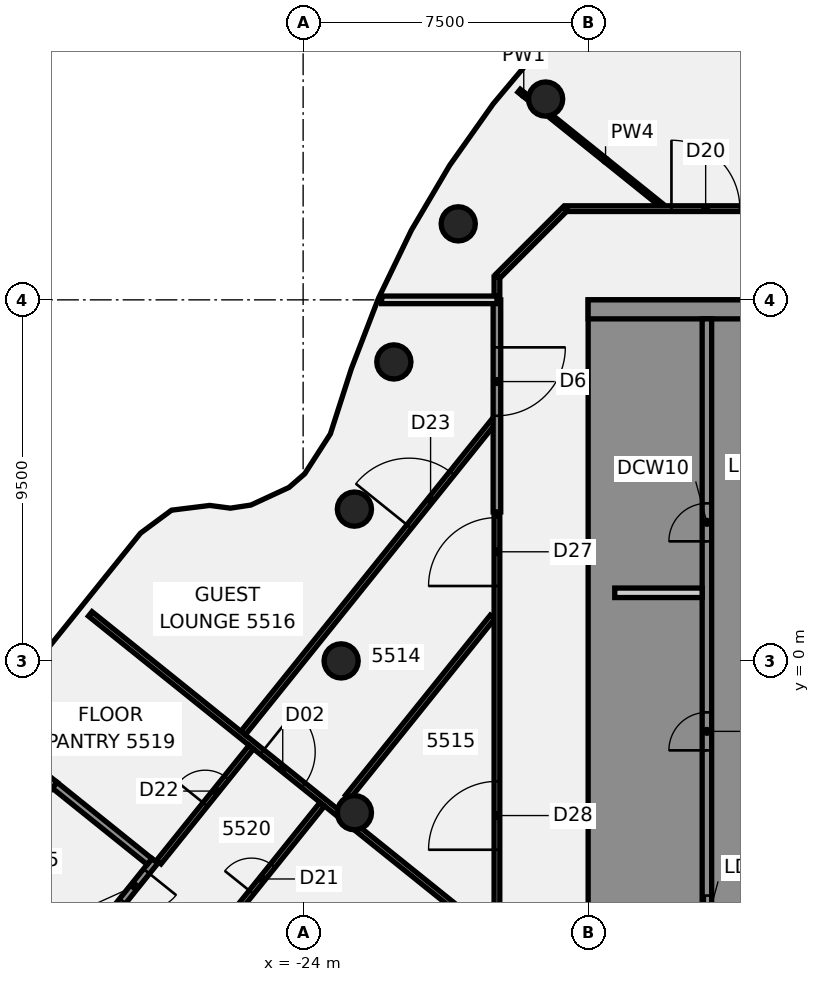
"""IFC4 building model, lengths in metres.
Left out: names, types, materials, properties, quantities, classifications, styles, units other than length and angle.
Written with IfcOpenShell. Run it as: python <this file> out.ifc"""

import sys

from ifc_helpers import new_model, si_unit, direction, frame, frame_2d, origin, origin_2d, place, context, subcontext, project, spatial, polyline, rectangle, circle, outline, extrude, element, fill, save


model = new_model("IFC4")
c1 = context("Model", 3, precision=1e-05, world=origin(), true_north=direction((0.0, 1.0)))
c2 = subcontext(c1, "Body", "Model", "MODEL_VIEW")
j1 = project(units=[si_unit("LENGTHUNIT", "METRE"), si_unit("PLANEANGLEUNIT", "RADIAN")], contexts=[c1])
p1 = place(None, origin())
s1 = spatial("IfcSite", under=j1, at=p1, CompositionType="ELEMENT")
p2 = place(p1, origin())
s2 = spatial("IfcBuilding", under=s1, at=p2, CompositionType="ELEMENT")
p3 = place(p2, frame((0.0, 0.0, 219.9)))
s3 = spatial("IfcBuildingStorey", under=s2, at=p3, CompositionType="ELEMENT", Elevation=219.9)
for number, where, z_axis, x_axis in (
    (1, (-17.619, 14.784, -0.14), (0.0, 0.0, 1.0), (1.0, 0.0, 0.0)),
    (2, (-19.919, 11.5, -0.14), (0.0, 0.0, 1.0), (1.0, 0.0, 0.0)),
    (3, (-21.613, 7.866, -0.14), (0.0, 0.0, 1.0), (1.0, 0.0, 0.0)),
    (4, (-22.651, 3.994, -0.14), (0.0, 0.0, 1.0), (1.0, 0.0, 0.0)),
    (5, (-23.0, 0.0, -0.14), (0.0, 0.0, 1.0), (1.0, 0.0, 0.0)),
    (6, (-22.651, -3.994, -0.14), (0.0, 0.0, 1.0), (1.0, 0.0, 0.0)),
):
    element("IfcColumn", number, at=place(p3, frame(where, z_axis=z_axis, x_axis=x_axis)), inside=s3, PredefinedType="COLUMN", context=c2, shape_type="SweptSolid", body=[
        extrude(circle(Radius=0.45, at=origin_2d()), origin(), (0.0, 0.0, 1.0), 3.6),
    ])
p4 = place(p3, frame((-29.602, 1.236, 0.0), z_axis=(0.0, 0.0, 1.0), x_axis=(0.779408775424, -0.626515730681, 0.0)))
e7 = element("IfcWall", 7, at=p4, inside=s3, PredefinedType="PARTITIONING", context=c2, shape_type="SweptSolid", body=[
    extrude(rectangle(XDim=8.332, YDim=0.15, at=frame_2d((4.166, 0.0))), origin(), (0.0, 0.0, 1.0), 2.864),
])
p5 = place(p4, frame((5.799, 0.0, 0.0)))
e8 = element("IfcOpeningElement", 8, at=p5, cuts=e7, PredefinedType="OPENING", context=c2, shape_type="SweptSolid", body=[
    extrude(rectangle(XDim=1.4, YDim=2.1, at=frame_2d((0.7, 1.05))), frame((0.0, 0.085, 0.0), z_axis=(0.0, -1.0, 0.0), x_axis=(1.0, 0.0, 0.0)), (0.0, 0.0, 1.0), 0.17),
])
p6 = place(p3, frame((-22.555, -4.428, 0.0), z_axis=(0.0, 0.0, 1.0), x_axis=(0.779423896045, -0.626496919604, 0.0)))
e9 = element("IfcWall", 9, at=p6, inside=s3, PredefinedType="PARTITIONING", context=c2, shape_type="SweptSolid", body=[
    extrude(rectangle(XDim=4.556, YDim=0.15, at=frame_2d((2.278, 0.0))), origin(), (0.0, 0.0, 1.0), 2.864),
])
p7 = place(p3, frame((-18.316, 15.002, 0.0), z_axis=(0.0, 0.0, 1.0), x_axis=(0.779570290479, -0.626314746914, 0.0)))
e10 = element("IfcWall", 10, at=p7, inside=s3, PredefinedType="PARTITIONING", context=c2, shape_type="SweptSolid", body=[
    extrude(rectangle(XDim=0.312, YDim=0.1, at=frame_2d((0.156, 0.0))), origin(), (0.0, 0.0, 1.0), 2.864),
])
p8 = place(p3, frame((-17.509, 14.354, 0.0), z_axis=(0.0, 0.0, 1.0), x_axis=(0.779411679893, -0.626512117398, 0.0)))
e11 = element("IfcWall", 11, at=p8, inside=s3, PredefinedType="PARTITIONING", context=c2, shape_type="SweptSolid", body=[
    extrude(rectangle(XDim=3.765, YDim=0.1, at=frame_2d((1.883, 0.0))), origin(), (0.0, 0.0, 1.0), 2.864),
])
p9 = place(p3, frame((-12.665, 22.432, 0.0), z_axis=(0.0, 0.0, 1.0), x_axis=(0.779284245227, -0.626670619338, 0.0)))
e12 = element("IfcWall", 12, at=p9, inside=s3, PredefinedType="PARTITIONING", context=c2, shape_type="SweptSolid", body=[
    extrude(rectangle(XDim=16.621, YDim=0.15, at=frame_2d((8.311, 0.0))), origin(), (0.0, 0.0, 1.0), 2.864),
])
p10 = place(p3, frame((-17.065, 11.9, 0.0), z_axis=(0.0, 0.0, 1.0), x_axis=(1.0, 0.0, 0.0)))
e13 = element("IfcWall", 13, at=p10, inside=s3, PredefinedType="PARTITIONING", context=c2, shape_type="SweptSolid", body=[
    extrude(rectangle(XDim=34.165, YDim=0.15, at=frame_2d((17.083, 0.0))), origin(), (0.0, 0.0, 1.0), 2.864),
])
p11 = place(p10, frame((24.142, 0.0, 0.0)))
e14 = element("IfcOpeningElement", 14, at=p11, cuts=e13, PredefinedType="OPENING", context=c2, shape_type="SweptSolid", body=[
    extrude(rectangle(XDim=1.8, YDim=2.1, at=frame_2d((0.9, 1.05))), frame((0.0, 0.085, 0.0), z_axis=(0.0, -1.0, 0.0), x_axis=(1.0, 0.0, 0.0)), (0.0, 0.0, 1.0), 0.17),
])
p12 = place(p10, frame((9.207, 0.0, 0.0)))
e15 = element("IfcOpeningElement", 15, at=p12, cuts=e13, PredefinedType="OPENING", context=c2, shape_type="SweptSolid", body=[
    extrude(rectangle(XDim=1.8, YDim=2.1, at=frame_2d((0.9, 1.05))), frame((0.0, 0.085, 0.0), z_axis=(0.0, -1.0, 0.0), x_axis=(1.0, 0.0, 0.0)), (0.0, 0.0, 1.0), 0.17),
])
p13 = place(p10, frame((2.757, 0.0, 0.0)))
e16 = element("IfcOpeningElement", 16, at=p13, cuts=e13, PredefinedType="OPENING", context=c2, shape_type="SweptSolid", body=[
    extrude(rectangle(XDim=1.8, YDim=2.1, at=frame_2d((0.9, 1.05))), frame((0.0, 0.085, 0.0), z_axis=(0.0, -1.0, 0.0), x_axis=(1.0, 0.0, 0.0)), (0.0, 0.0, 1.0), 0.17),
])
p14 = place(p3, frame((-18.872, 10.128, 0.0), z_axis=(0.0, 0.0, 1.0), x_axis=(0.707106781187, 0.707106781187, 0.0)))
e17 = element("IfcWall", 17, at=p14, inside=s3, PredefinedType="PARTITIONING", context=c2, shape_type="SweptSolid", body=[
    extrude(rectangle(XDim=2.505, YDim=0.15, at=frame_2d((1.253, 0.0))), origin(), (0.0, 0.0, 1.0), 2.864),
])
p15 = place(p3, frame((-29.036, -10.665, 0.0), z_axis=(0.0, 0.0, 1.0), x_axis=(0.626350653384, 0.779541441493, 0.0)))
e18 = element("IfcWall", 18, at=p15, inside=s3, PredefinedType="PARTITIONING", context=c2, shape_type="SweptSolid", body=[
    extrude(rectangle(XDim=8.84, YDim=0.15, at=frame_2d((4.42, 0.0))), origin(), (0.0, 0.0, 1.0), 2.864),
])
p16 = place(p15, frame((5.87, 0.0, 0.0)))
e19 = element("IfcOpeningElement", 19, at=p16, cuts=e18, PredefinedType="OPENING", context=c2, shape_type="SweptSolid", body=[
    extrude(rectangle(XDim=0.9, YDim=2.1, at=frame_2d((0.45, 1.05))), frame((0.0, 0.085, 0.0), z_axis=(0.0, -1.0, 0.0), x_axis=(1.0, 0.0, 0.0)), (0.0, 0.0, 1.0), 0.17),
])
p17 = place(p3, frame((-27.798, -5.295, 0.0), z_axis=(0.0, 0.0, 1.0), x_axis=(0.626664805056, 0.779288920814, 0.0)))
e20 = element("IfcWall", 20, at=p17, inside=s3, PredefinedType="PARTITIONING", context=c2, shape_type="SweptSolid", body=[
    extrude(rectangle(XDim=3.881, YDim=0.15, at=frame_2d((1.94, 0.0))), origin(), (0.0, 0.0, 1.0), 2.864),
])
p18 = place(p17, frame((1.95, 0.0, 0.0)))
e21 = element("IfcOpeningElement", 21, at=p18, cuts=e20, PredefinedType="OPENING", context=c2, shape_type="SweptSolid", body=[
    extrude(rectangle(XDim=0.9, YDim=2.1, at=frame_2d((0.45, 1.05))), frame((0.0, 0.085, 0.0), z_axis=(0.0, -1.0, 0.0), x_axis=(1.0, 0.0, 0.0)), (0.0, 0.0, 1.0), 0.17),
])
p19 = place(p3, frame((-25.578, -1.897, 0.0), z_axis=(0.0, 0.0, 1.0), x_axis=(0.626651590672, 0.779299546971, 0.0)))
e22 = element("IfcWall", 22, at=p19, inside=s3, PredefinedType="PARTITIONING", context=c2, shape_type="SweptSolid", body=[
    extrude(rectangle(XDim=10.656, YDim=0.15, at=frame_2d((5.328, 0.0))), origin(), (0.0, 0.0, 1.0), 2.864),
])
p20 = place(p19, frame((6.97, 0.0, 0.0)))
e23 = element("IfcOpeningElement", 23, at=p20, cuts=e22, PredefinedType="OPENING", context=c2, shape_type="SweptSolid", body=[
    extrude(rectangle(XDim=1.8, YDim=2.1, at=frame_2d((0.9, 1.05))), frame((0.0, 0.085, 0.0), z_axis=(0.0, -1.0, 0.0), x_axis=(1.0, 0.0, 0.0)), (0.0, 0.0, 1.0), 0.17),
])
p21 = place(p3, frame((-22.826, -3.581, 0.0), z_axis=(0.0, 0.0, 1.0), x_axis=(0.626622427276, 0.779322996988, 0.0)))
e24 = element("IfcWall", 24, at=p21, inside=s3, PredefinedType="PARTITIONING", context=c2, shape_type="SweptSolid", body=[
    extrude(rectangle(XDim=6.08, YDim=0.15, at=frame_2d((3.04, 0.0))), origin(), (0.0, 0.0, 1.0), 2.864),
])
p22 = place(p3, frame((-18.9, -10.1, 0.0), z_axis=(0.0, 0.0, 1.0), x_axis=(0.0, 1.0, 0.0)))
e25 = element("IfcWall", 25, at=p22, inside=s3, PredefinedType="PARTITIONING", context=c2, shape_type="SweptSolid", body=[
    extrude(rectangle(XDim=13.921, YDim=0.15, at=frame_2d((6.96, 0.0))), origin(), (0.0, 0.0, 1.0), 2.864),
])
p23 = place(p22, frame((12.071, 0.0, 0.0)))
e26 = element("IfcOpeningElement", 26, at=p23, cuts=e25, PredefinedType="OPENING", context=c2, shape_type="SweptSolid", body=[
    extrude(rectangle(XDim=1.8, YDim=2.1, at=frame_2d((0.9, 1.05))), frame((0.0, 0.085, 0.0), z_axis=(0.0, -1.0, 0.0), x_axis=(1.0, 0.0, 0.0)), (0.0, 0.0, 1.0), 0.17),
])
p24 = place(p22, frame((5.131, 0.0, 0.0)))
e27 = element("IfcOpeningElement", 27, at=p24, cuts=e25, PredefinedType="OPENING", context=c2, shape_type="SweptSolid", body=[
    extrude(rectangle(XDim=1.8, YDim=2.1, at=frame_2d((0.9, 1.05))), frame((0.0, 0.085, 0.0), z_axis=(0.0, -1.0, 0.0), x_axis=(1.0, 0.0, 0.0)), (0.0, 0.0, 1.0), 0.17),
])
p25 = place(p3, frame((-18.9, 9.6, 0.0), z_axis=(0.0, 0.0, 1.0), x_axis=(0.0, 1.0, 0.0)))
e28 = element("IfcWall", 28, at=p25, inside=s3, PredefinedType="PARTITIONING", context=c2, shape_type="SweptSolid", body=[
    extrude(rectangle(XDim=0.5, YDim=0.15, at=frame_2d((0.25, 0.0))), origin(), (0.0, 0.0, 1.0), 2.864),
])
p26 = place(p3, frame((-18.9, 9.5, 0.0), z_axis=(0.0, 0.0, 1.0), x_axis=(0.0, -1.0, 0.0)))
e29 = element("IfcWall", 29, at=p26, inside=s3, PredefinedType="SOLIDWALL", context=c2, shape_type="SweptSolid", body=[
    extrude(rectangle(XDim=5.579, YDim=0.2, at=frame_2d((2.79, 0.0))), origin(), (0.0, 0.0, 1.0), 2.964),
])
p27 = place(p26, frame((1.25, 0.0, 0.0)))
e30 = element("IfcOpeningElement", 30, at=p27, cuts=e29, PredefinedType="OPENING", context=c2, shape_type="SweptSolid", body=[
    extrude(rectangle(XDim=1.8, YDim=2.4, at=frame_2d((0.9, 1.2))), frame((0.0, 0.11, 0.0), z_axis=(0.0, -1.0, 0.0), x_axis=(1.0, 0.0, 0.0)), (0.0, 0.0, 1.0), 0.22),
])
p28 = place(p3, frame((-18.9, 9.5, 0.0), z_axis=(0.0, 0.0, 1.0), x_axis=(-1.0, 0.0, 0.0)))
e31 = element("IfcWall", 31, at=p28, inside=s3, PredefinedType="SOLIDWALL", context=c2, shape_type="SweptSolid", body=[
    extrude(rectangle(XDim=3.033, YDim=0.2, at=frame_2d((1.517, 0.0))), origin(), (0.0, 0.0, 1.0), 3.46),
])
p29 = place(p3, origin())
e32 = element("IfcWall", 32, at=p29, inside=s3, PredefinedType="SHEAR", context=c2, shape_type="SweptSolid", body=[
    extrude(outline(polyline([(-13.5, -8.125), (-16.0, -8.125), (-16.0, -5.625), (-13.5, -5.625), (-13.5, -5.375), (-16.0, -5.375), (-16.0, 5.375), (-13.5, 5.375), (-13.5, 5.625), (-16.0, 5.625), (-16.0, 8.125), (-13.5, 8.125), (-13.5, 9.0), (-16.0, 9.0), (-16.5, 9.0), (-16.5, -9.0), (-16.0, -9.0), (-13.5, -9.0), (-13.5, -8.125)])), origin(), (0.0, 0.0, 1.0), 3.46),
])
p30 = place(p3, frame((-16.5, 9.25, 0.0), z_axis=(0.0, 0.0, 1.0), x_axis=(1.0, 0.0, 0.0)))
e33 = element("IfcWall", 33, at=p30, inside=s3, PredefinedType="SHEAR", context=c2, shape_type="SweptSolid", body=[
    extrude(rectangle(XDim=13.0, YDim=0.5, at=frame_2d((6.5, 0.0))), origin(), (0.0, 0.0, 1.0), 3.46),
])
p31 = place(p3, frame((-13.375, -9.0, 0.0), z_axis=(0.0, 0.0, 1.0), x_axis=(0.0, 1.0, 0.0)))
e34 = element("IfcWall", 34, at=p31, inside=s3, PredefinedType="SHEAR", context=c2, shape_type="SweptSolid", body=[
    extrude(rectangle(XDim=18.0, YDim=0.25, at=frame_2d((9.0, 0.0))), origin(), (0.0, 0.0, 1.0), 3.46),
])
p32 = place(p31, frame((1.425, 0.0, 0.0)))
e35 = element("IfcOpeningElement", 35, at=p32, cuts=e34, PredefinedType="OPENING", context=c2, shape_type="SweptSolid", body=[
    extrude(rectangle(XDim=1.4, YDim=2.1, at=frame_2d((0.7, 1.05))), frame((0.0, 0.135, 0.0), z_axis=(0.0, -1.0, 0.0), x_axis=(1.0, 0.0, 0.0)), (0.0, 0.0, 1.0), 0.27),
])
p33 = place(p31, frame((6.646, 0.0, 0.0)))
e36 = element("IfcOpeningElement", 36, at=p33, cuts=e34, PredefinedType="OPENING", context=c2, shape_type="SweptSolid", body=[
    extrude(rectangle(XDim=1.0, YDim=2.1, at=frame_2d((0.5, 1.05))), frame((0.0, 0.135, 0.0), z_axis=(0.0, -1.0, 0.0), x_axis=(1.0, 0.0, 0.0)), (0.0, 0.0, 1.0), 0.27),
])
p34 = place(p31, frame((12.146, 0.0, 0.0)))
e37 = element("IfcOpeningElement", 37, at=p34, cuts=e34, PredefinedType="OPENING", context=c2, shape_type="SweptSolid", body=[
    extrude(rectangle(XDim=1.0, YDim=2.1, at=frame_2d((0.5, 1.05))), frame((0.0, 0.135, 0.0), z_axis=(0.0, -1.0, 0.0), x_axis=(1.0, 0.0, 0.0)), (0.0, 0.0, 1.0), 0.27),
])
p35 = place(p3, frame((-15.8, 1.792, 0.0), z_axis=(0.0, 0.0, 1.0), x_axis=(1.0, 0.0, 0.0)))
e38 = element("IfcWall", 38, at=p35, inside=s3, PredefinedType="PARTITIONING", context=c2, shape_type="SweptSolid", body=[
    extrude(rectangle(XDim=2.3, YDim=0.25, at=frame_2d((1.15, 0.0))), origin(), (0.0, 0.0, 1.0), 3.46),
])
p36 = place(p3, frame((-27.901, -5.264, -0.14), z_axis=(0.0, 0.0, 1.0), x_axis=(-0.626674952142, -0.779280760932, 0.0)))
e39 = element("IfcWall", 39, at=p36, inside=s3, PredefinedType="SHEAR", context=c2, shape_type="SweptSolid", body=[
    extrude(rectangle(XDim=6.7, YDim=0.2, at=frame_2d((3.35, 0.0))), origin(), (0.0, 0.0, 1.0), 3.004),
])
p37 = place(p36, frame((0.35, 0.0, 0.0)))
e40 = element("IfcOpeningElement", 40, at=p37, cuts=e39, PredefinedType="OPENING", context=c2, shape_type="SweptSolid", body=[
    extrude(rectangle(XDim=1.0, YDim=2.1, at=frame_2d((0.5, 1.05))), frame((0.0, 0.11, 0.0), z_axis=(0.0, -1.0, 0.0), x_axis=(1.0, 0.0, 0.0)), (0.0, 0.0, 1.0), 0.22),
])
p38 = place(p3, frame((-30.551, -3.133, -0.14), z_axis=(0.0, 0.0, 1.0), x_axis=(-0.626652822867, -0.779298556134, 0.0)))
e41 = element("IfcWall", 41, at=p38, inside=s3, PredefinedType="SHEAR", context=c2, shape_type="SweptSolid", body=[
    extrude(rectangle(XDim=6.7, YDim=0.2, at=frame_2d((3.35, 0.0))), origin(), (0.0, 0.0, 1.0), 3.004),
])
p39 = place(p3, frame((-30.535, -3.274, -0.14), z_axis=(0.0, 0.0, 1.0), x_axis=(0.779273387841, -0.626684120592, 0.0)))
e42 = element("IfcWall", 42, at=p39, inside=s3, PredefinedType="SHEAR", context=c2, shape_type="SweptSolid", body=[
    extrude(rectangle(XDim=3.2, YDim=0.2, at=frame_2d((1.6, 0.0))), origin(), (0.0, 0.0, 1.0), 3.004),
])
p40 = place(p5, origin())
e43 = element("IfcDoor", 43, at=p40, inside=s3, OperationType="DOUBLE_DOOR_SINGLE_SWING", PredefinedType="DOOR", context=c2, shape_type="SweptSolid", body=[
    extrude(rectangle(XDim=1.4, YDim=2.1, at=frame_2d((0.7, 1.05))), frame((0.0, 0.025, 0.0), z_axis=(0.0, -1.0, 0.0), x_axis=(1.0, 0.0, 0.0)), (0.0, 0.0, 1.0), 0.05),
])
fill(e8, e43)
p41 = place(p13, origin())
e44 = element("IfcDoor", 44, at=p41, inside=s3, OperationType="DOUBLE_DOOR_SINGLE_SWING", PredefinedType="DOOR", context=c2, shape_type="SweptSolid", body=[
    extrude(rectangle(XDim=1.8, YDim=2.1, at=frame_2d((0.9, 1.05))), frame((0.0, 0.025, 0.0), z_axis=(0.0, -1.0, 0.0), x_axis=(1.0, 0.0, 0.0)), (0.0, 0.0, 1.0), 0.05),
])
fill(e16, e44)
p42 = place(p16, frame((0.9, 0.0, 0.0), z_axis=(0.0, 0.0, 1.0), x_axis=(-1.0, 0.0, 0.0)))
e45 = element("IfcDoor", 45, at=p42, inside=s3, OperationType="SINGLE_SWING_RIGHT", PredefinedType="DOOR", context=c2, shape_type="SweptSolid", body=[
    extrude(rectangle(XDim=0.9, YDim=2.1, at=frame_2d((0.45, 1.05))), frame((0.0, 0.025, 0.0), z_axis=(0.0, -1.0, 0.0), x_axis=(1.0, 0.0, 0.0)), (0.0, 0.0, 1.0), 0.05),
])
fill(e19, e45)
p43 = place(p18, origin())
e46 = element("IfcDoor", 46, at=p43, inside=s3, OperationType="SINGLE_SWING_LEFT", PredefinedType="DOOR", context=c2, shape_type="SweptSolid", body=[
    extrude(rectangle(XDim=0.9, YDim=2.1, at=frame_2d((0.45, 1.05))), frame((0.0, 0.025, 0.0), z_axis=(0.0, -1.0, 0.0), x_axis=(1.0, 0.0, 0.0)), (0.0, 0.0, 1.0), 0.05),
])
fill(e21, e46)
p44 = place(p20, origin())
e47 = element("IfcDoor", 47, at=p44, inside=s3, OperationType="DOUBLE_DOOR_SINGLE_SWING", PredefinedType="DOOR", context=c2, shape_type="SweptSolid", body=[
    extrude(rectangle(XDim=1.8, YDim=2.1, at=frame_2d((0.9, 1.05))), frame((0.0, 0.025, 0.0), z_axis=(0.0, -1.0, 0.0), x_axis=(1.0, 0.0, 0.0)), (0.0, 0.0, 1.0), 0.05),
])
fill(e23, e47)
p45 = place(p23, frame((1.8, 0.0, 0.0), z_axis=(0.0, 0.0, 1.0), x_axis=(-1.0, 0.0, 0.0)))
e48 = element("IfcDoor", 48, at=p45, inside=s3, OperationType="DOUBLE_DOOR_SINGLE_SWING", PredefinedType="DOOR", context=c2, shape_type="SweptSolid", body=[
    extrude(rectangle(XDim=1.8, YDim=2.1, at=frame_2d((0.9, 1.05))), frame((0.0, 0.025, 0.0), z_axis=(0.0, -1.0, 0.0), x_axis=(1.0, 0.0, 0.0)), (0.0, 0.0, 1.0), 0.05),
])
fill(e26, e48)
p46 = place(p24, origin())
e49 = element("IfcDoor", 49, at=p46, inside=s3, OperationType="DOUBLE_DOOR_SINGLE_SWING", PredefinedType="DOOR", context=c2, shape_type="SweptSolid", body=[
    extrude(rectangle(XDim=1.8, YDim=2.1, at=frame_2d((0.9, 1.05))), frame((0.0, 0.025, 0.0), z_axis=(0.0, -1.0, 0.0), x_axis=(1.0, 0.0, 0.0)), (0.0, 0.0, 1.0), 0.05),
])
fill(e27, e49)
p47 = place(p27, origin())
e50 = element("IfcDoor", 50, at=p47, inside=s3, OperationType="SINGLE_SWING_LEFT", PredefinedType="DOOR", context=c2, shape_type="SweptSolid", body=[
    extrude(rectangle(XDim=1.8, YDim=2.4, at=frame_2d((0.9, 1.2))), frame((0.0, 0.025, 0.0), z_axis=(0.0, -1.0, 0.0), x_axis=(1.0, 0.0, 0.0)), (0.0, 0.0, 1.0), 0.05),
])
fill(e30, e50)
p48 = place(p32, origin())
e51 = element("IfcDoor", 51, at=p48, inside=s3, OperationType="SLIDING_TO_LEFT", PredefinedType="DOOR", context=c2, shape_type="SweptSolid", body=[
    extrude(rectangle(XDim=1.4, YDim=2.1, at=frame_2d((0.7, 1.05))), frame((0.0, 0.025, 0.0), z_axis=(0.0, -1.0, 0.0), x_axis=(1.0, 0.0, 0.0)), (0.0, 0.0, 1.0), 0.05),
])
fill(e35, e51)
p49 = place(p33, origin())
e52 = element("IfcDoor", 52, at=p49, inside=s3, OperationType="SINGLE_SWING_LEFT", PredefinedType="DOOR", context=c2, shape_type="SweptSolid", body=[
    extrude(rectangle(XDim=1.0, YDim=2.1, at=frame_2d((0.5, 1.05))), frame((0.0, 0.025, 0.0), z_axis=(0.0, -1.0, 0.0), x_axis=(1.0, 0.0, 0.0)), (0.0, 0.0, 1.0), 0.05),
])
fill(e36, e52)
p50 = place(p34, origin())
e53 = element("IfcDoor", 53, at=p50, inside=s3, OperationType="SINGLE_SWING_LEFT", PredefinedType="DOOR", context=c2, shape_type="SweptSolid", body=[
    extrude(rectangle(XDim=1.0, YDim=2.1, at=frame_2d((0.5, 1.05))), frame((0.0, 0.025, 0.0), z_axis=(0.0, -1.0, 0.0), x_axis=(1.0, 0.0, 0.0)), (0.0, 0.0, 1.0), 0.05),
])
fill(e37, e53)
p51 = place(p37, origin())
e54 = element("IfcDoor", 54, at=p51, inside=s3, OperationType="SINGLE_SWING_LEFT", PredefinedType="DOOR", context=c2, shape_type="SweptSolid", body=[
    extrude(rectangle(XDim=1.0, YDim=2.1, at=frame_2d((0.5, 1.05))), frame((0.0, 0.025, 0.0), z_axis=(0.0, -1.0, 0.0), x_axis=(1.0, 0.0, 0.0)), (0.0, 0.0, 1.0), 0.05),
])
fill(e40, e54)
save(model, sys.argv[1])
